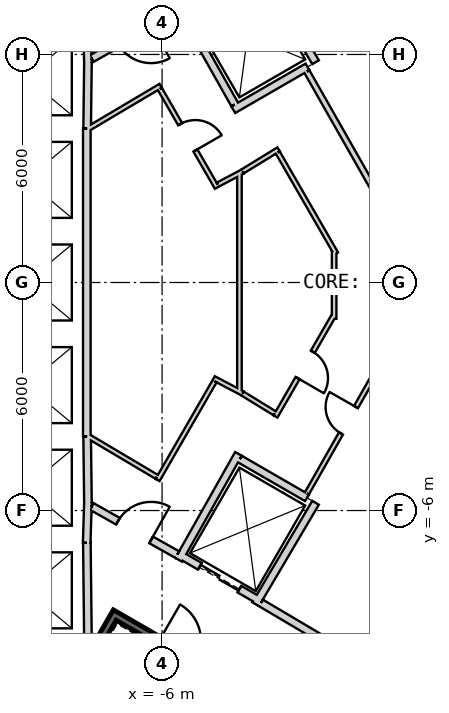
"""IFC4 building model, lengths in metres.
Left out: names, types, materials, properties, quantities, classifications, styles, units other than length and angle.
Written with IfcOpenShell. Run it as: python <this file> out.ifc"""

import sys

from ifc_helpers import new_model, si_unit, direction, frame, frame_2d, origin, place, context, subcontext, project, spatial, rectangle, extrude, element, fill, save


model = new_model("IFC4")
c1 = context("Model", 3, precision=1e-05, world=origin(), true_north=direction((0.0, 1.0)))
c2 = subcontext(c1, "Body", "Model", "MODEL_VIEW")
j1 = project(units=[si_unit("LENGTHUNIT", "METRE"), si_unit("PLANEANGLEUNIT", "RADIAN")], contexts=[c1])
p1 = place(None, origin())
s1 = spatial("IfcSite", under=j1, at=p1, CompositionType="ELEMENT")
p2 = place(p1, origin())
s2 = spatial("IfcBuilding", under=s1, at=p2, CompositionType="ELEMENT")
p3 = place(p2, frame((0.0, 0.0, 94.7)))
s3 = spatial("IfcBuildingStorey", under=s2, at=p3, CompositionType="ELEMENT", Elevation=94.7)
p4 = place(p3, frame((19.475, 2.208, 0.0), z_axis=(0.0, 0.0, 1.0), x_axis=(-0.866028369851, 0.499994862586, 0.0)))
e1 = element("IfcWall", 1, at=p4, inside=s3, PredefinedType="SHEAR", context=c2, shape_type="SweptSolid", body=[
    extrude(rectangle(XDim=31.523, YDim=0.9, at=frame_2d((15.762, 0.0))), origin(), (0.0, 0.0, 1.0), 4.1),
])
p5 = place(p4, frame((7.062, 0.0, 0.0)))
e2 = element("IfcOpeningElement", 2, at=p5, cuts=e1, PredefinedType="OPENING", context=c2, shape_type="SweptSolid", body=[
    extrude(rectangle(XDim=1.2, YDim=2.4, at=frame_2d((0.6, 1.2))), frame((0.0, 0.46, 0.0), z_axis=(0.0, -1.0, 0.0), x_axis=(1.0, 0.0, 0.0)), (0.0, 0.0, 1.0), 0.92),
])
p6 = place(p4, frame((9.762, 0.0, 0.0)))
e3 = element("IfcOpeningElement", 3, at=p6, cuts=e1, PredefinedType="OPENING", context=c2, shape_type="SweptSolid", body=[
    extrude(rectangle(XDim=1.2, YDim=2.4, at=frame_2d((0.6, 1.2))), frame((0.0, 0.46, 0.0), z_axis=(0.0, -1.0, 0.0), x_axis=(1.0, 0.0, 0.0)), (0.0, 0.0, 1.0), 0.92),
])
p7 = place(p4, frame((12.462, 0.0, 0.0)))
e4 = element("IfcOpeningElement", 4, at=p7, cuts=e1, PredefinedType="OPENING", context=c2, shape_type="SweptSolid", body=[
    extrude(rectangle(XDim=1.2, YDim=2.4, at=frame_2d((0.6, 1.2))), frame((0.0, 0.46, 0.0), z_axis=(0.0, -1.0, 0.0), x_axis=(1.0, 0.0, 0.0)), (0.0, 0.0, 1.0), 0.92),
])
p8 = place(p4, frame((15.162, 0.0, 0.0)))
e5 = element("IfcOpeningElement", 5, at=p8, cuts=e1, PredefinedType="OPENING", context=c2, shape_type="SweptSolid", body=[
    extrude(rectangle(XDim=1.2, YDim=2.4, at=frame_2d((0.6, 1.2))), frame((0.0, 0.46, 0.0), z_axis=(0.0, -1.0, 0.0), x_axis=(1.0, 0.0, 0.0)), (0.0, 0.0, 1.0), 0.92),
])
p9 = place(p4, frame((17.862, 0.0, 0.0)))
e6 = element("IfcOpeningElement", 6, at=p9, cuts=e1, PredefinedType="OPENING", context=c2, shape_type="SweptSolid", body=[
    extrude(rectangle(XDim=1.2, YDim=2.4, at=frame_2d((0.6, 1.2))), frame((0.0, 0.46, 0.0), z_axis=(0.0, -1.0, 0.0), x_axis=(1.0, 0.0, 0.0)), (0.0, 0.0, 1.0), 0.92),
])
p10 = place(p4, frame((20.562, 0.0, 0.0)))
e7 = element("IfcOpeningElement", 7, at=p10, cuts=e1, PredefinedType="OPENING", context=c2, shape_type="SweptSolid", body=[
    extrude(rectangle(XDim=1.2, YDim=2.4, at=frame_2d((0.6, 1.2))), frame((0.0, 0.46, 0.0), z_axis=(0.0, -1.0, 0.0), x_axis=(1.0, 0.0, 0.0)), (0.0, 0.0, 1.0), 0.92),
])
p11 = place(p4, frame((23.262, 0.0, 0.0)))
e8 = element("IfcOpeningElement", 8, at=p11, cuts=e1, PredefinedType="OPENING", context=c2, shape_type="SweptSolid", body=[
    extrude(rectangle(XDim=1.2, YDim=2.4, at=frame_2d((0.6, 1.2))), frame((0.0, 0.46, 0.0), z_axis=(0.0, -1.0, 0.0), x_axis=(1.0, 0.0, 0.0)), (0.0, 0.0, 1.0), 0.92),
])
p12 = place(p4, frame((3.612, 0.0, 0.0)))
e9 = element("IfcOpeningElement", 9, at=p12, cuts=e1, PredefinedType="OPENING", context=c2, shape_type="SweptSolid", body=[
    extrude(rectangle(XDim=1.2, YDim=2.4, at=frame_2d((0.6, 1.2))), frame((0.0, 0.46, 0.0), z_axis=(0.0, -1.0, 0.0), x_axis=(1.0, 0.0, 0.0)), (0.0, 0.0, 1.0), 0.92),
])
p13 = place(p4, frame((26.712, 0.0, 0.0)))
e10 = element("IfcOpeningElement", 10, at=p13, cuts=e1, PredefinedType="OPENING", context=c2, shape_type="SweptSolid", body=[
    extrude(rectangle(XDim=1.2, YDim=2.4, at=frame_2d((0.6, 1.2))), frame((0.0, 0.46, 0.0), z_axis=(0.0, -1.0, 0.0), x_axis=(1.0, 0.0, 0.0)), (0.0, 0.0, 1.0), 0.92),
])
p14 = place(p3, frame((-7.825, -17.97, 0.0), z_axis=(0.0, 0.0, 1.0), x_axis=(0.866028369851, 0.499994862586, 0.0)))
e11 = element("IfcWall", 11, at=p14, inside=s3, PredefinedType="SHEAR", context=c2, shape_type="SweptSolid", body=[
    extrude(rectangle(XDim=31.523, YDim=0.9, at=frame_2d((15.762, 0.0))), origin(), (0.0, 0.0, 1.0), 4.1),
])
p15 = place(p14, frame((7.062, 0.0, 0.0)))
e12 = element("IfcOpeningElement", 12, at=p15, cuts=e11, PredefinedType="OPENING", context=c2, shape_type="SweptSolid", body=[
    extrude(rectangle(XDim=1.2, YDim=2.4, at=frame_2d((0.6, 1.2))), frame((0.0, 0.46, 0.0), z_axis=(0.0, -1.0, 0.0), x_axis=(1.0, 0.0, 0.0)), (0.0, 0.0, 1.0), 0.92),
])
p16 = place(p14, frame((9.762, 0.0, 0.0)))
e13 = element("IfcOpeningElement", 13, at=p16, cuts=e11, PredefinedType="OPENING", context=c2, shape_type="SweptSolid", body=[
    extrude(rectangle(XDim=1.2, YDim=2.4, at=frame_2d((0.6, 1.2))), frame((0.0, 0.46, 0.0), z_axis=(0.0, -1.0, 0.0), x_axis=(1.0, 0.0, 0.0)), (0.0, 0.0, 1.0), 0.92),
])
p17 = place(p14, frame((12.462, 0.0, 0.0)))
e14 = element("IfcOpeningElement", 14, at=p17, cuts=e11, PredefinedType="OPENING", context=c2, shape_type="SweptSolid", body=[
    extrude(rectangle(XDim=1.2, YDim=2.4, at=frame_2d((0.6, 1.2))), frame((0.0, 0.46, 0.0), z_axis=(0.0, -1.0, 0.0), x_axis=(1.0, 0.0, 0.0)), (0.0, 0.0, 1.0), 0.92),
])
p18 = place(p14, frame((15.162, 0.0, 0.0)))
e15 = element("IfcOpeningElement", 15, at=p18, cuts=e11, PredefinedType="OPENING", context=c2, shape_type="SweptSolid", body=[
    extrude(rectangle(XDim=1.2, YDim=2.4, at=frame_2d((0.6, 1.2))), frame((0.0, 0.46, 0.0), z_axis=(0.0, -1.0, 0.0), x_axis=(1.0, 0.0, 0.0)), (0.0, 0.0, 1.0), 0.92),
])
p19 = place(p14, frame((17.862, 0.0, 0.0)))
e16 = element("IfcOpeningElement", 16, at=p19, cuts=e11, PredefinedType="OPENING", context=c2, shape_type="SweptSolid", body=[
    extrude(rectangle(XDim=1.2, YDim=2.4, at=frame_2d((0.6, 1.2))), frame((0.0, 0.46, 0.0), z_axis=(0.0, -1.0, 0.0), x_axis=(1.0, 0.0, 0.0)), (0.0, 0.0, 1.0), 0.92),
])
p20 = place(p14, frame((20.562, 0.0, 0.0)))
e17 = element("IfcOpeningElement", 17, at=p20, cuts=e11, PredefinedType="OPENING", context=c2, shape_type="SweptSolid", body=[
    extrude(rectangle(XDim=1.2, YDim=2.4, at=frame_2d((0.6, 1.2))), frame((0.0, 0.46, 0.0), z_axis=(0.0, -1.0, 0.0), x_axis=(1.0, 0.0, 0.0)), (0.0, 0.0, 1.0), 0.92),
])
p21 = place(p14, frame((26.712, 0.0, 0.0)))
e18 = element("IfcOpeningElement", 18, at=p21, cuts=e11, PredefinedType="OPENING", context=c2, shape_type="SweptSolid", body=[
    extrude(rectangle(XDim=1.2, YDim=2.4, at=frame_2d((0.6, 1.2))), frame((0.0, 0.46, 0.0), z_axis=(0.0, -1.0, 0.0), x_axis=(1.0, 0.0, 0.0)), (0.0, 0.0, 1.0), 0.92),
])
p22 = place(p14, frame((3.612, 0.0, 0.0)))
e19 = element("IfcOpeningElement", 19, at=p22, cuts=e11, PredefinedType="OPENING", context=c2, shape_type="SweptSolid", body=[
    extrude(rectangle(XDim=1.2, YDim=2.4, at=frame_2d((0.6, 1.2))), frame((0.0, 0.46, 0.0), z_axis=(0.0, -1.0, 0.0), x_axis=(1.0, 0.0, 0.0)), (0.0, 0.0, 1.0), 0.92),
])
p23 = place(p3, frame((-7.977, 6.65, 0.0), z_axis=(0.0, 0.0, 1.0), x_axis=(0.030861509705, -0.999523670164, 0.0)))
e20 = element("IfcWall", 20, at=p23, inside=s3, PredefinedType="PLUMBINGWALL", context=c2, shape_type="SweptSolid", body=[
    extrude(rectangle(XDim=0.878, YDim=0.2, at=frame_2d((0.439, 0.0))), origin(), (0.0, 0.0, 1.0), 3.8),
])
p24 = place(p3, frame((-7.949, 5.895, 0.0), z_axis=(0.0, 0.0, 1.0), x_axis=(-0.012042535896, -0.999927486035, 0.0)))
e21 = element("IfcWall", 21, at=p24, inside=s3, PredefinedType="PLUMBINGWALL", context=c2, shape_type="SweptSolid", body=[
    extrude(rectangle(XDim=1.845, YDim=0.2, at=frame_2d((0.922, 0.0))), origin(), (0.0, 0.0, 1.0), 3.8),
])
p25 = place(p3, frame((-7.98, 4.05, 0.0), z_axis=(0.0, 0.0, 1.0), x_axis=(0.0, -1.0, 0.0)))
e22 = element("IfcWall", 22, at=p25, inside=s3, PredefinedType="PLUMBINGWALL", context=c2, shape_type="SweptSolid", body=[
    extrude(rectangle(XDim=8.1, YDim=0.2, at=frame_2d((4.05, 0.0))), origin(), (0.0, 0.0, 1.0), 3.8),
])
p26 = place(p3, frame((-7.95, -5.772, 0.0), z_axis=(0.0, 0.0, 1.0), x_axis=(-0.030803413295, -0.999525462272, 0.0)))
e23 = element("IfcWall", 23, at=p26, inside=s3, PredefinedType="PLUMBINGWALL", context=c2, shape_type="SweptSolid", body=[
    extrude(rectangle(XDim=1.078, YDim=0.2, at=frame_2d((0.539, 0.0))), origin(), (0.0, 0.0, 1.0), 3.8),
])
p27 = place(p3, frame((-7.971, -4.05, 0.0), z_axis=(0.0, 0.0, 1.0), x_axis=(0.012042535896, -0.999927486035, 0.0)))
e24 = element("IfcWall", 24, at=p27, inside=s3, PredefinedType="PLUMBINGWALL", context=c2, shape_type="SweptSolid", body=[
    extrude(rectangle(XDim=1.845, YDim=0.2, at=frame_2d((0.922, 0.0))), origin(), (0.0, 0.0, 1.0), 3.8),
])
p28 = place(p3, frame((-7.979, -6.85, 0.0), z_axis=(0.0, 0.0, 1.0), x_axis=(0.011121475088, -0.999938154483, 0.0)))
e25 = element("IfcWall", 25, at=p28, inside=s3, PredefinedType="PLUMBINGWALL", context=c2, shape_type="SweptSolid", body=[
    extrude(rectangle(XDim=2.7, YDim=0.2, at=frame_2d((1.35, 0.0))), origin(), (0.0, 0.0, 1.0), 3.8),
])
p29 = place(p3, frame((-1.13, -9.831, 0.0), z_axis=(0.0, 0.0, 1.0), x_axis=(0.874269620932, 0.485440655401, 0.0)))
e26 = element("IfcWall", 26, at=p29, inside=s3, PredefinedType="PLUMBINGWALL", context=c2, shape_type="SweptSolid", body=[
    extrude(rectangle(XDim=1.845, YDim=0.2, at=frame_2d((0.922, 0.0))), origin(), (0.0, 0.0, 1.0), 3.8),
])
p30 = place(p3, frame((-3.538, 8.465, 0.0), z_axis=(0.0, 0.0, 1.0), x_axis=(0.508647062354, -0.860975125052, 0.0)))
e27 = element("IfcWall", 27, at=p30, inside=s3, PredefinedType="PLUMBINGWALL", context=c2, shape_type="SweptSolid", body=[
    extrude(rectangle(XDim=3.1, YDim=0.2, at=frame_2d((1.55, 0.0))), origin(), (0.0, 0.0, 1.0), 3.8),
])
p31 = place(p3, frame((-2.173, 5.673, 0.0), z_axis=(0.0, 0.0, 1.0), x_axis=(-0.866028691075, -0.499994306202, 0.0)))
e28 = element("IfcWall", 28, at=p31, inside=s3, PredefinedType="PLUMBINGWALL", context=c2, shape_type="SweptSolid", body=[
    extrude(rectangle(XDim=2.254, YDim=0.2, at=frame_2d((1.127, 0.0))), origin(), (0.0, 0.0, 1.0), 3.8),
])
p32 = place(p3, frame((-5.562, 7.296, 0.0), z_axis=(0.0, 0.0, 1.0), x_axis=(0.49134651263, -0.870964180966, 0.0)))
e29 = element("IfcWall", 29, at=p32, inside=s3, PredefinedType="PLUMBINGWALL", context=c2, shape_type="SweptSolid", body=[
    extrude(rectangle(XDim=3.0, YDim=0.2, at=frame_2d((1.5, 0.0))), origin(), (0.0, 0.0, 1.0), 3.8),
])
p33 = place(p3, frame((-7.196, -8.663, -0.3), z_axis=(0.0, 0.0, 1.0), x_axis=(-0.499997992926, -0.866026562566, 0.0)))
e30 = element("IfcWall", 30, at=p33, inside=s3, PredefinedType="SHEAR", context=c2, shape_type="SweptSolid", body=[
    extrude(rectangle(XDim=7.9, YDim=0.2, at=frame_2d((3.95, 0.0))), origin(), (0.0, 0.0, 1.0), 4.1),
])
p34 = place(p3, frame((-4.041, -10.599, -0.3), z_axis=(0.0, 0.0, 1.0), x_axis=(-0.866047807691, 0.499961193289, 0.0)))
e31 = element("IfcWall", 31, at=p34, inside=s3, PredefinedType="SHEAR", context=c2, shape_type="SweptSolid", body=[
    extrude(rectangle(XDim=3.6, YDim=0.2, at=frame_2d((1.8, 0.0))), origin(), (0.0, 0.0, 1.0), 4.1),
])
p35 = place(p34, frame((1.25, 0.0, 0.3)))
e32 = element("IfcOpeningElement", 32, at=p35, cuts=e31, PredefinedType="OPENING", context=c2, shape_type="SweptSolid", body=[
    extrude(rectangle(XDim=1.1, YDim=2.1, at=frame_2d((0.55, 1.05))), frame((0.0, 0.11, 0.0), z_axis=(0.0, -1.0, 0.0), x_axis=(1.0, 0.0, 0.0)), (0.0, 0.0, 1.0), 0.22),
])
p36 = place(p3, frame((-3.446, -8.368, 0.0), z_axis=(0.0, 0.0, 1.0), x_axis=(-0.866024647952, 0.500001309137, 0.0)))
e33 = element("IfcWall", 33, at=p36, inside=s3, PredefinedType="PLUMBINGWALL", context=c2, shape_type="SweptSolid", body=[
    extrude(rectangle(XDim=2.4, YDim=0.2, at=frame_2d((1.2, 0.0))), origin(), (0.0, 0.0, 1.0), 3.8),
])
p37 = place(p36, frame((0.6, 0.0, 0.0)))
e34 = element("IfcOpeningElement", 34, at=p37, cuts=e33, PredefinedType="OPENING", context=c2, shape_type="SweptSolid", body=[
    extrude(rectangle(XDim=1.2, YDim=2.4, at=frame_2d((0.6, 1.2))), frame((0.0, 0.11, 0.0), z_axis=(0.0, -1.0, 0.0), x_axis=(1.0, 0.0, 0.0)), (0.0, 0.0, 1.0), 0.22),
])
p38 = place(p3, frame((-1.961, -5.796, 0.0), z_axis=(0.0, 0.0, 1.0), x_axis=(-0.508647062354, -0.860975125052, 0.0)))
e35 = element("IfcWall", 35, at=p38, inside=s3, PredefinedType="PLUMBINGWALL", context=c2, shape_type="SweptSolid", body=[
    extrude(rectangle(XDim=3.1, YDim=0.2, at=frame_2d((1.55, 0.0))), origin(), (0.0, 0.0, 1.0), 3.8),
])
p39 = place(p3, frame((-3.99, -4.509, 0.0), z_axis=(0.0, 0.0, 1.0), x_axis=(-0.491358283181, -0.870957540612, 0.0)))
e36 = element("IfcWall", 36, at=p39, inside=s3, PredefinedType="PLUMBINGWALL", context=c2, shape_type="SweptSolid", body=[
    extrude(rectangle(XDim=3.2, YDim=0.2, at=frame_2d((1.6, 0.0))), origin(), (0.0, 0.0, 1.0), 3.8),
])
p40 = place(p3, frame((-3.953, -4.646, 0.0), z_axis=(0.0, 0.0, 1.0), x_axis=(0.866032100247, -0.499988401207, 0.0)))
e37 = element("IfcWall", 37, at=p40, inside=s3, PredefinedType="PLUMBINGWALL", context=c2, shape_type="SweptSolid", body=[
    extrude(rectangle(XDim=2.04, YDim=0.2, at=frame_2d((1.02, 0.0))), origin(), (0.0, 0.0, 1.0), 3.8),
])
p41 = place(p3, frame((-5.6, 7.16, 0.0), z_axis=(0.0, 0.0, 1.0), x_axis=(-0.871363259478, -0.490638431059, 0.0)))
e38 = element("IfcWall", 38, at=p41, inside=s3, PredefinedType="PARTITIONING", context=c2, shape_type="SweptSolid", body=[
    extrude(rectangle(XDim=2.581, YDim=0.2, at=frame_2d((1.291, 0.0))), origin(), (0.0, 0.0, 1.0), 3.8),
])
p42 = place(p41, frame((0.791, 0.0, 0.0)))
e39 = element("IfcOpeningElement", 39, at=p42, cuts=e38, PredefinedType="OPENING", context=c2, shape_type="SweptSolid", body=[
    extrude(rectangle(XDim=1.0, YDim=2.1, at=frame_2d((0.5, 1.05))), frame((0.0, 0.11, 0.0), z_axis=(0.0, -1.0, 0.0), x_axis=(1.0, 0.0, 0.0)), (0.0, 0.0, 1.0), 0.22),
])
p43 = place(p3, frame((-3.401, -8.43, 0.0), z_axis=(0.0, 0.0, 1.0), x_axis=(0.860615607571, -0.509255118781, 0.0)))
e40 = element("IfcWall", 40, at=p43, inside=s3, PredefinedType="PARTITIONING", context=c2, shape_type="SweptSolid", body=[
    extrude(rectangle(XDim=2.581, YDim=0.2, at=frame_2d((1.29, 0.0))), origin(), (0.0, 0.0, 1.0), 3.8),
])
p44 = place(p3, frame((-7.849, -5.894, 0.0), z_axis=(0.0, 0.0, 1.0), x_axis=(0.871363259478, -0.490638431059, 0.0)))
e41 = element("IfcWall", 41, at=p44, inside=s3, PredefinedType="PARTITIONING", context=c2, shape_type="SweptSolid", body=[
    extrude(rectangle(XDim=2.581, YDim=0.2, at=frame_2d((1.291, 0.0))), origin(), (0.0, 0.0, 1.0), 3.8),
])
p45 = place(p44, frame((0.791, 0.0, 0.0)))
e42 = element("IfcOpeningElement", 42, at=p45, cuts=e41, PredefinedType="OPENING", context=c2, shape_type="SweptSolid", body=[
    extrude(rectangle(XDim=1.0, YDim=2.1, at=frame_2d((0.5, 1.05))), frame((0.0, 0.11, 0.0), z_axis=(0.0, -1.0, 0.0), x_axis=(1.0, 0.0, 0.0)), (0.0, 0.0, 1.0), 0.22),
])
p46 = place(p3, frame((-2.189, 5.549, 0.0), z_axis=(0.0, 0.0, 1.0), x_axis=(0.494335077001, -0.869271437266, 0.0)))
e43 = element("IfcWall", 43, at=p46, inside=s3, PredefinedType="PLUMBINGWALL", context=c2, shape_type="SweptSolid", body=[
    extrude(rectangle(XDim=4.404, YDim=0.15, at=frame_2d((2.202, 0.0))), origin(), (0.0, 0.0, 1.0), 3.8),
])
p47 = place(p3, frame((0.051, -1.611, 0.0), z_axis=(0.0, 0.0, 1.0), x_axis=(-0.49434454467, -0.869266053148, 0.0)))
e44 = element("IfcWall", 44, at=p47, inside=s3, PredefinedType="PARTITIONING", context=c2, shape_type="SweptSolid", body=[
    extrude(rectangle(XDim=4.53, YDim=0.12, at=frame_2d((2.265, 0.0))), origin(), (0.0, 0.0, 1.0), 3.8),
])
p48 = place(p47, frame((1.916, 0.0, 0.0)))
e45 = element("IfcOpeningElement", 45, at=p48, cuts=e44, PredefinedType="OPENING", context=c2, shape_type="SweptSolid", body=[
    extrude(rectangle(XDim=0.8, YDim=2.1, at=frame_2d((0.4, 1.05))), frame((0.0, 0.07, 0.0), z_axis=(0.0, -1.0, 0.0), x_axis=(1.0, 0.0, 0.0)), (0.0, 0.0, 1.0), 0.14),
])
p49 = place(p3, frame((-3.964, -2.908, 0.0), z_axis=(0.0, 0.0, 1.0), x_axis=(0.0, 1.0, 0.0)))
e46 = element("IfcWall", 46, at=p49, inside=s3, PredefinedType="PARTITIONING", context=c2, shape_type="SweptSolid", body=[
    extrude(rectangle(XDim=5.815, YDim=0.12, at=frame_2d((2.908, 0.0))), origin(), (0.0, 0.0, 1.0), 3.8),
])
p50 = place(p3, frame((-4.641, -2.519, 0.0), z_axis=(0.0, 0.0, 1.0), x_axis=(0.885386208329, -0.464856173564, 0.0)))
e47 = element("IfcWall", 47, at=p50, inside=s3, PredefinedType="PARTITIONING", context=c2, shape_type="SweptSolid", body=[
    extrude(rectangle(XDim=0.859, YDim=0.12, at=frame_2d((0.43, 0.0))), origin(), (0.0, 0.0, 1.0), 3.8),
])
p51 = place(p3, frame((-6.118, -5.197, 0.0), z_axis=(0.0, 0.0, 1.0), x_axis=(0.499990139034, 0.866031096941, 0.0)))
e48 = element("IfcWall", 48, at=p51, inside=s3, PredefinedType="PARTITIONING", context=c2, shape_type="SweptSolid", body=[
    extrude(rectangle(XDim=3.0, YDim=0.12, at=frame_2d((1.5, 0.0))), origin(), (0.0, 0.0, 1.0), 3.8),
])
p52 = place(p3, frame((-7.95, -4.041, 0.0), z_axis=(0.0, 0.0, 1.0), x_axis=(0.860112457103, -0.510104461004, 0.0)))
e49 = element("IfcWall", 49, at=p52, inside=s3, PredefinedType="PARTITIONING", context=c2, shape_type="SweptSolid", body=[
    extrude(rectangle(XDim=2.104, YDim=0.12, at=frame_2d((1.052, 0.0))), origin(), (0.0, 0.0, 1.0), 3.8),
])
p53 = place(p3, frame((-6.037, 5.176, 0.0), z_axis=(0.0, 0.0, 1.0), x_axis=(-0.860106072674, -0.510115225953, 0.0)))
e50 = element("IfcWall", 50, at=p53, inside=s3, PredefinedType="PARTITIONING", context=c2, shape_type="SweptSolid", body=[
    extrude(rectangle(XDim=2.225, YDim=0.12, at=frame_2d((1.112, 0.0))), origin(), (0.0, 0.0, 1.0), 3.8),
])
p54 = place(p3, frame((-4.558, 2.495, 0.0), z_axis=(0.0, 0.0, 1.0), x_axis=(-0.499990139034, 0.866031096941, 0.0)))
e51 = element("IfcWall", 51, at=p54, inside=s3, PredefinedType="PARTITIONING", context=c2, shape_type="SweptSolid", body=[
    extrude(rectangle(XDim=3.0, YDim=0.12, at=frame_2d((1.5, 0.0))), origin(), (0.0, 0.0, 1.0), 3.8),
])
p55 = place(p54, frame((1.13, 0.0, 0.0)))
e52 = element("IfcOpeningElement", 52, at=p55, cuts=e51, PredefinedType="OPENING", context=c2, shape_type="SweptSolid", body=[
    extrude(rectangle(XDim=0.8, YDim=2.1, at=frame_2d((0.4, 1.05))), frame((0.0, 0.07, 0.0), z_axis=(0.0, -1.0, 0.0), x_axis=(1.0, 0.0, 0.0)), (0.0, 0.0, 1.0), 0.14),
])
p56 = place(p3, frame((-3.881, 2.919, 0.0), z_axis=(0.0, 0.0, 1.0), x_axis=(-0.885333337811, -0.464956859246, 0.0)))
e53 = element("IfcWall", 53, at=p56, inside=s3, PredefinedType="PARTITIONING", context=c2, shape_type="SweptSolid", body=[
    extrude(rectangle(XDim=0.739, YDim=0.12, at=frame_2d((0.37, 0.0))), origin(), (0.0, 0.0, 1.0), 3.8),
])
p57 = place(p3, frame((-2.935, 3.503, 0.0), z_axis=(0.0, 0.0, 1.0), x_axis=(-0.852471794044, -0.522773220774, 0.0)))
e54 = element("IfcWall", 54, at=p57, inside=s3, PredefinedType="PARTITIONING", context=c2, shape_type="SweptSolid", body=[
    extrude(rectangle(XDim=1.112, YDim=0.12, at=frame_2d((0.556, 0.0))), origin(), (0.0, 0.0, 1.0), 3.8),
])
p58 = place(p3, frame((-1.42, 0.76, 0.0), z_axis=(0.0, 0.0, 1.0), x_axis=(-0.500011413361, 0.866018814177, 0.0)))
e55 = element("IfcWall", 55, at=p58, inside=s3, PredefinedType="PARTITIONING", context=c2, shape_type="SweptSolid", body=[
    extrude(rectangle(XDim=3.072, YDim=0.12, at=frame_2d((1.536, 0.0))), origin(), (0.0, 0.0, 1.0), 3.8),
])
p59 = place(p3, frame((-1.472, -0.954, 0.0), z_axis=(0.0, 0.0, 1.0), x_axis=(0.0, 1.0, 0.0)))
e56 = element("IfcWall", 56, at=p59, inside=s3, PredefinedType="PARTITIONING", context=c2, shape_type="SweptSolid", body=[
    extrude(rectangle(XDim=1.785, YDim=0.12, at=frame_2d((0.893, 0.0))), origin(), (0.0, 0.0, 1.0), 3.8),
])
p60 = place(p3, frame((-3.016, -3.524, 0.0), z_axis=(0.0, 0.0, 1.0), x_axis=(0.499988681553, 0.866031938394, 0.0)))
e57 = element("IfcWall", 57, at=p60, inside=s3, PredefinedType="PARTITIONING", context=c2, shape_type="SweptSolid", body=[
    extrude(rectangle(XDim=3.069, YDim=0.12, at=frame_2d((1.535, 0.0))), origin(), (0.0, 0.0, 1.0), 3.8),
])
p61 = place(p60, frame((1.165, 0.0, 0.0)))
e58 = element("IfcOpeningElement", 58, at=p61, cuts=e57, PredefinedType="OPENING", context=c2, shape_type="SweptSolid", body=[
    extrude(rectangle(XDim=0.8, YDim=2.1, at=frame_2d((0.4, 1.05))), frame((0.0, 0.07, 0.0), z_axis=(0.0, -1.0, 0.0), x_axis=(1.0, 0.0, 0.0)), (0.0, 0.0, 1.0), 0.14),
])
p62 = place(p3, frame((-3.883, -2.922, 0.0), z_axis=(0.0, 0.0, 1.0), x_axis=(0.852477364208, -0.522764137554, 0.0)))
e59 = element("IfcWall", 59, at=p62, inside=s3, PredefinedType="PARTITIONING", context=c2, shape_type="SweptSolid", body=[
    extrude(rectangle(XDim=0.991, YDim=0.12, at=frame_2d((0.496, 0.0))), origin(), (0.0, 0.0, 1.0), 3.8),
])
p63 = place(p3, frame((-3.072, -18.747, 0.0), z_axis=(0.0, 0.0, 1.0), x_axis=(0.866027760718, 0.499995917648, 0.0)))
e60 = element("IfcWall", 60, at=p63, inside=s3, PredefinedType="PARTITIONING", context=c2, shape_type="SweptSolid", body=[
    extrude(rectangle(XDim=28.233, YDim=0.2, at=frame_2d((14.117, 0.0))), origin(), (0.0, 0.0, 1.0), 2.98),
])
p64 = place(p63, frame((13.617, 0.0, 0.0)))
e61 = element("IfcOpeningElement", 61, at=p64, cuts=e60, PredefinedType="OPENING", context=c2, shape_type="SweptSolid", body=[
    extrude(rectangle(XDim=1.0, YDim=2.1, at=frame_2d((0.5, 1.05))), frame((0.0, 0.11, 0.0), z_axis=(0.0, -1.0, 0.0), x_axis=(1.0, 0.0, 0.0)), (0.0, 0.0, 1.0), 0.22),
])
p65 = place(p45, origin())
e62 = element("IfcDoor", 62, at=p65, inside=s3, OperationType="SINGLE_SWING_LEFT", PredefinedType="USERDEFINED", context=c2, shape_type="SweptSolid", body=[
    extrude(rectangle(XDim=1.0, YDim=2.1, at=frame_2d((0.5, 1.05))), frame((0.0, 0.025, 0.0), z_axis=(0.0, -1.0, 0.0), x_axis=(1.0, 0.0, 0.0)), (0.0, 0.0, 1.0), 0.05),
])
fill(e42, e62)
p66 = place(p37, origin())
e63 = element("IfcDoor", 63, at=p66, inside=s3, OperationType="SLIDING_TO_LEFT", PredefinedType="USERDEFINED", context=c2, shape_type="SweptSolid", body=[
    extrude(rectangle(XDim=1.2, YDim=2.4, at=frame_2d((0.6, 1.2))), frame((0.0, 0.025, 0.0), z_axis=(0.0, -1.0, 0.0), x_axis=(1.0, 0.0, 0.0)), (0.0, 0.0, 1.0), 0.05),
])
fill(e34, e63)
p67 = place(p48, origin())
e64 = element("IfcDoor", 64, at=p67, inside=s3, OperationType="SINGLE_SWING_RIGHT", PredefinedType="USERDEFINED", context=c2, shape_type="SweptSolid", body=[
    extrude(rectangle(XDim=0.8, YDim=2.1, at=frame_2d((0.4, 1.05))), frame((0.0, 0.025, 0.0), z_axis=(0.0, -1.0, 0.0), x_axis=(1.0, 0.0, 0.0)), (0.0, 0.0, 1.0), 0.05),
])
fill(e45, e64)
p68 = place(p55, origin())
e65 = element("IfcDoor", 65, at=p68, inside=s3, OperationType="SINGLE_SWING_LEFT", PredefinedType="USERDEFINED", context=c2, shape_type="SweptSolid", body=[
    extrude(rectangle(XDim=0.8, YDim=2.1, at=frame_2d((0.4, 1.05))), frame((0.0, 0.025, 0.0), z_axis=(0.0, -1.0, 0.0), x_axis=(1.0, 0.0, 0.0)), (0.0, 0.0, 1.0), 0.05),
])
fill(e52, e65)
p69 = place(p61, origin())
e66 = element("IfcDoor", 66, at=p69, inside=s3, OperationType="SINGLE_SWING_LEFT", PredefinedType="USERDEFINED", context=c2, shape_type="SweptSolid", body=[
    extrude(rectangle(XDim=0.8, YDim=2.1, at=frame_2d((0.4, 1.05))), frame((0.0, 0.025, 0.0), z_axis=(0.0, -1.0, 0.0), x_axis=(1.0, 0.0, 0.0)), (0.0, 0.0, 1.0), 0.05),
])
fill(e58, e66)
save(model, sys.argv[1])
